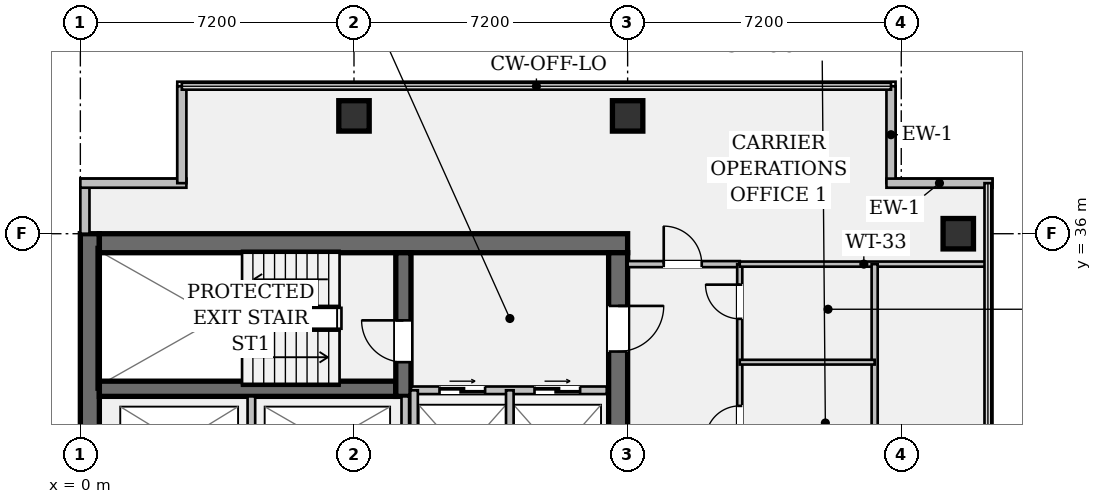
"""IFC4 building model, lengths in metres.
Left out: names, types, materials, properties, quantities, classifications, styles, units other than length and angle.
Written with IfcOpenShell. Run it as: python <this file> out.ifc"""

import sys

from ifc_helpers import new_model, si_unit, direction, frame, frame_2d, origin, origin_2d, place, context, subcontext, project, spatial, rectangle, hollow_rectangle, extrude, element, fill, save


model = new_model("IFC4")
c1 = context("Model", 3, precision=1e-05, world=origin(), true_north=direction((0.0, 1.0)))
c2 = subcontext(c1, "Body", "Model", "MODEL_VIEW")
j1 = project(units=[si_unit("LENGTHUNIT", "METRE"), si_unit("PLANEANGLEUNIT", "RADIAN")], contexts=[c1])
p1 = place(None, origin())
s1 = spatial("IfcSite", under=j1, at=p1, CompositionType="ELEMENT")
p2 = place(p1, origin())
s2 = spatial("IfcBuilding", under=s1, at=p2, CompositionType="ELEMENT")
p3 = place(p2, frame((0.0, 0.0, 187.25)))
s3 = spatial("IfcBuildingStorey", under=s2, at=p3, CompositionType="ELEMENT", Elevation=187.25)
p4 = place(p3, frame((0.25, 7.2, 0.0), z_axis=(0.0, 0.0, 1.0), x_axis=(0.0, 1.0, 0.0)))
e1 = element("IfcWall", 1, at=p4, inside=s3, PredefinedType="SHEAR", context=c2, shape_type="SweptSolid", body=[
    extrude(rectangle(XDim=28.8, YDim=0.5, at=frame_2d((14.4, 0.0))), origin(), (0.0, 0.0, 1.0), 3.24),
])
p5 = place(p3, frame((0.5, 35.75, 0.0), z_axis=(0.0, 0.0, 1.0), x_axis=(1.0, 0.0, 0.0)))
e2 = element("IfcWall", 2, at=p5, inside=s3, PredefinedType="SHEAR", context=c2, shape_type="SweptSolid", body=[
    extrude(rectangle(XDim=13.9, YDim=0.5, at=frame_2d((6.95, 0.0))), origin(), (0.0, 0.0, 1.0), 3.24),
])
p6 = place(p3, frame((14.15, 35.5, 0.0), z_axis=(0.0, 0.0, 1.0), x_axis=(0.0, -1.0, 0.0)))
e3 = element("IfcWall", 3, at=p6, inside=s3, PredefinedType="SHEAR", context=c2, shape_type="SweptSolid", body=[
    extrude(rectangle(XDim=27.8, YDim=0.5, at=frame_2d((13.9, 0.0))), origin(), (0.0, 0.0, 1.0), 3.24),
])
p7 = place(p6, frame((1.4, 0.0, 0.0)))
e4 = element("IfcOpeningElement", 4, at=p7, cuts=e3, PredefinedType="OPENING", context=c2, shape_type="SweptSolid", body=[
    extrude(rectangle(XDim=1.2, YDim=2.15, at=frame_2d((0.6, 1.075))), frame((0.0, 0.262, 0.0), z_axis=(0.0, -1.0, 0.0), x_axis=(1.0, 0.0, 0.0)), (0.0, 0.0, 1.0), 0.524),
])
p8 = place(p6, frame((25.35, 0.0, 0.0)))
e5 = element("IfcOpeningElement", 5, at=p8, cuts=e3, PredefinedType="OPENING", context=c2, shape_type="SweptSolid", body=[
    extrude(rectangle(XDim=1.2, YDim=2.15, at=frame_2d((0.6, 1.075))), frame((0.0, 0.262, 0.0), z_axis=(0.0, -1.0, 0.0), x_axis=(1.0, 0.0, 0.0)), (0.0, 0.0, 1.0), 0.524),
])
p9 = place(p6, frame((14.7, 0.0, 0.0)))
e6 = element("IfcOpeningElement", 6, at=p9, cuts=e3, PredefinedType="OPENING", context=c2, shape_type="SweptSolid", body=[
    extrude(rectangle(XDim=1.6, YDim=2.2, at=frame_2d((0.8, 1.1))), frame((0.0, 0.262, 0.0), z_axis=(0.0, -1.0, 0.0), x_axis=(1.0, 0.0, 0.0)), (0.0, 0.0, 1.0), 0.524),
])
p10 = place(p3, frame((0.5, 31.92, 0.0), z_axis=(0.0, 0.0, 1.0), x_axis=(1.0, 0.0, 0.0)))
e7 = element("IfcWall", 7, at=p10, inside=s3, PredefinedType="SHEAR", context=c2, shape_type="SweptSolid", body=[
    extrude(rectangle(XDim=7.8, YDim=0.4, at=frame_2d((3.9, 0.0))), origin(), (0.0, 0.0, 1.0), 3.24),
])
p11 = place(p3, frame((8.5, 31.72, 0.0), z_axis=(0.0, 0.0, 1.0), x_axis=(0.0, 1.0, 0.0)))
e8 = element("IfcWall", 8, at=p11, inside=s3, PredefinedType="SHEAR", context=c2, shape_type="SweptSolid", body=[
    extrude(rectangle(XDim=3.78, YDim=0.4, at=frame_2d((1.89, 0.0))), origin(), (0.0, 0.0, 1.0), 3.24),
])
p12 = place(p11, frame((0.9, 0.0, 0.0)))
e9 = element("IfcOpeningElement", 9, at=p12, cuts=e8, PredefinedType="OPENING", context=c2, shape_type="SweptSolid", body=[
    extrude(rectangle(XDim=1.1, YDim=2.15, at=frame_2d((0.55, 1.075))), frame((0.0, 0.212, 0.0), z_axis=(0.0, -1.0, 0.0), x_axis=(1.0, 0.0, 0.0)), (0.0, 0.0, 1.0), 0.424),
])
for number, where, z_axis, x_axis in (
    (10, (7.2, 39.1, 0.0), (0.0, 0.0, 1.0), (1.0, 0.0, 0.0)),
    (11, (14.4, 39.1, 0.0), (0.0, 0.0, 1.0), (1.0, 0.0, 0.0)),
    (12, (23.1, 36.0, 0.0), (0.0, 0.0, 1.0), (1.0, 0.0, 0.0)),
):
    element("IfcColumn", number, at=place(p3, frame(where, z_axis=z_axis, x_axis=x_axis)), inside=s3, PredefinedType="COLUMN", context=c2, shape_type="SweptSolid", body=[
        extrude(hollow_rectangle(XDim=0.8, YDim=0.8, WallThickness=0.05, at=origin_2d()), origin(), (0.0, 0.0, 1.0), 3.24),
    ])
p13 = place(p3, frame((0.12, 36.0, 0.0), z_axis=(0.0, 0.0, 1.0), x_axis=(0.0, 1.0, 0.0)))
e13 = element("IfcWall", 13, at=p13, inside=s3, PredefinedType="STANDARD", context=c2, shape_type="SweptSolid", body=[
    extrude(rectangle(XDim=1.33, YDim=0.24, at=frame_2d((0.665, 0.0))), origin(), (0.0, 0.0, 1.0), 3.24),
])
p14 = place(p3, frame((0.0, 37.33, 0.0), z_axis=(0.0, 0.0, 1.0), x_axis=(1.0, 0.0, 0.0)))
e14 = element("IfcWall", 14, at=p14, inside=s3, PredefinedType="STANDARD", context=c2, shape_type="SweptSolid", body=[
    extrude(rectangle(XDim=2.79, YDim=0.24, at=frame_2d((1.395, 0.0))), origin(), (0.0, 0.0, 1.0), 3.24),
])
for number, where, z_axis, x_axis in (
    (15, (2.67, 37.33, 0.0), (0.0, 0.0, 1.0), (0.0, 1.0, 0.0)),
    (16, (21.33, 39.88, 0.0), (0.0, 0.0, 1.0), (0.0, -1.0, 0.0)),
):
    element("IfcWall", number, at=place(p3, frame(where, z_axis=z_axis, x_axis=x_axis)), inside=s3, PredefinedType="STANDARD", context=c2, shape_type="SweptSolid", body=[
        extrude(rectangle(XDim=2.55, YDim=0.24, at=frame_2d((1.275, 0.0))), origin(), (0.0, 0.0, 1.0), 3.24),
    ])
p15 = place(p3, frame((21.21, 37.33, 0.0), z_axis=(0.0, 0.0, 1.0), x_axis=(1.0, 0.0, 0.0)))
e17 = element("IfcWall", 17, at=p15, inside=s3, PredefinedType="STANDARD", context=c2, shape_type="SweptSolid", body=[
    extrude(rectangle(XDim=2.79, YDim=0.24, at=frame_2d((1.395, 0.0))), origin(), (0.0, 0.0, 1.0), 3.24),
])
p16 = place(p3, frame((8.7, 31.88, 0.0), z_axis=(0.0, 0.0, 1.0), x_axis=(1.0, 0.0, 0.0)))
e18 = element("IfcWall", 18, at=p16, inside=s3, PredefinedType="PARTITIONING", context=c2, shape_type="SweptSolid", body=[
    extrude(rectangle(XDim=5.15, YDim=0.2, at=frame_2d((2.575, 0.0))), origin(), (0.0, 0.0, 1.0), 3.24),
])
p17 = place(p16, frame((0.75, 0.0, 0.0)))
e19 = element("IfcOpeningElement", 19, at=p17, cuts=e18, PredefinedType="OPENING", context=c2, shape_type="SweptSolid", body=[
    extrude(rectangle(XDim=1.2, YDim=2.2, at=frame_2d((0.6, 1.1))), frame((0.0, 0.112, 0.0), z_axis=(0.0, -1.0, 0.0), x_axis=(1.0, 0.0, 0.0)), (0.0, 0.0, 1.0), 0.224),
])
p18 = place(p16, frame((3.25, 0.0, 0.0)))
e20 = element("IfcOpeningElement", 20, at=p18, cuts=e18, PredefinedType="OPENING", context=c2, shape_type="SweptSolid", body=[
    extrude(rectangle(XDim=1.2, YDim=2.2, at=frame_2d((0.6, 1.1))), frame((0.0, 0.112, 0.0), z_axis=(0.0, -1.0, 0.0), x_axis=(1.0, 0.0, 0.0)), (0.0, 0.0, 1.0), 0.224),
])
for number, where, z_axis, x_axis in (
    (21, (8.78, 28.78, 0.0), (0.0, 0.0, 1.0), (0.0, 1.0, 0.0)),
    (22, (11.3, 28.78, 0.0), (0.0, 0.0, 1.0), (0.0, 1.0, 0.0)),
):
    element("IfcWall", number, at=place(p3, frame(where, z_axis=z_axis, x_axis=x_axis)), inside=s3, PredefinedType="PARTITIONING", context=c2, shape_type="SweptSolid", body=[
        extrude(rectangle(XDim=3.1, YDim=0.2, at=frame_2d((1.55, 0.0))), origin(), (0.0, 0.0, 1.0), 3.24),
    ])
for number, where, z_axis, x_axis in (
    (23, (4.5, 28.78, 0.0), (0.0, 0.0, 1.0), (0.0, 1.0, 0.0)),
    (24, (8.55, 28.78, 0.0), (0.0, 0.0, 1.0), (0.0, 1.0, 0.0)),
):
    element("IfcWall", number, at=place(p3, frame(where, z_axis=z_axis, x_axis=x_axis)), inside=s3, PredefinedType="PARTITIONING", context=c2, shape_type="SweptSolid", body=[
        extrude(rectangle(XDim=2.94, YDim=0.2, at=frame_2d((1.47, 0.0))), origin(), (0.0, 0.0, 1.0), 3.24),
    ])
p19 = place(p3, frame((14.4, 35.2, 0.0), z_axis=(0.0, 0.0, 1.0), x_axis=(1.0, 0.0, 0.0)))
e25 = element("IfcWall", 25, at=p19, inside=s3, PredefinedType="PARTITIONING", context=c2, shape_type="SweptSolid", body=[
    extrude(rectangle(XDim=2.95, YDim=0.16, at=frame_2d((1.475, 0.0))), origin(), (0.0, 0.0, 1.0), 2.808),
])
p20 = place(p19, frame((0.95, 0.0, 0.0)))
e26 = element("IfcOpeningElement", 26, at=p20, cuts=e25, PredefinedType="OPENING", context=c2, shape_type="SweptSolid", body=[
    extrude(rectangle(XDim=1.0, YDim=2.15, at=frame_2d((0.5, 1.075))), frame((0.0, 0.092, 0.0), z_axis=(0.0, -1.0, 0.0), x_axis=(1.0, 0.0, 0.0)), (0.0, 0.0, 1.0), 0.184),
])
p21 = place(p3, frame((17.35, 20.35, 0.0), z_axis=(0.0, 0.0, 1.0), x_axis=(0.0, 1.0, 0.0)))
e27 = element("IfcWall", 27, at=p21, inside=s3, PredefinedType="PARTITIONING", context=c2, shape_type="SweptSolid", body=[
    extrude(rectangle(XDim=14.85, YDim=0.135, at=frame_2d((7.425, 0.0))), origin(), (0.0, 0.0, 1.0), 2.603),
])
p22 = place(p21, frame((3.84, 0.0, 0.0)))
e28 = element("IfcOpeningElement", 28, at=p22, cuts=e27, PredefinedType="OPENING", context=c2, shape_type="SweptSolid", body=[
    extrude(rectangle(XDim=0.9, YDim=2.15, at=frame_2d((0.45, 1.075))), frame((0.0, 0.08, 0.0), z_axis=(0.0, -1.0, 0.0), x_axis=(1.0, 0.0, 0.0)), (0.0, 0.0, 1.0), 0.159),
])
p23 = place(p21, frame((7.04, 0.0, 0.0)))
e29 = element("IfcOpeningElement", 29, at=p23, cuts=e27, PredefinedType="OPENING", context=c2, shape_type="SweptSolid", body=[
    extrude(rectangle(XDim=0.9, YDim=2.15, at=frame_2d((0.45, 1.075))), frame((0.0, 0.08, 0.0), z_axis=(0.0, -1.0, 0.0), x_axis=(1.0, 0.0, 0.0)), (0.0, 0.0, 1.0), 0.159),
])
p24 = place(p21, frame((10.22, 0.0, 0.0)))
e30 = element("IfcOpeningElement", 30, at=p24, cuts=e27, PredefinedType="OPENING", context=c2, shape_type="SweptSolid", body=[
    extrude(rectangle(XDim=0.9, YDim=2.15, at=frame_2d((0.45, 1.075))), frame((0.0, 0.08, 0.0), z_axis=(0.0, -1.0, 0.0), x_axis=(1.0, 0.0, 0.0)), (0.0, 0.0, 1.0), 0.159),
])
p25 = place(p21, frame((13.41, 0.0, 0.0)))
e31 = element("IfcOpeningElement", 31, at=p25, cuts=e27, PredefinedType="OPENING", context=c2, shape_type="SweptSolid", body=[
    extrude(rectangle(XDim=0.9, YDim=2.15, at=frame_2d((0.45, 1.075))), frame((0.0, 0.08, 0.0), z_axis=(0.0, -1.0, 0.0), x_axis=(1.0, 0.0, 0.0)), (0.0, 0.0, 1.0), 0.159),
])
p26 = place(p3, frame((17.35, 35.2, 0.0), z_axis=(0.0, 0.0, 1.0), x_axis=(1.0, 0.0, 0.0)))
e32 = element("IfcWall", 32, at=p26, inside=s3, PredefinedType="PARTITIONING", context=c2, shape_type="SweptSolid", body=[
    extrude(rectangle(XDim=6.53, YDim=0.135, at=frame_2d((3.265, 0.0))), origin(), (0.0, 0.0, 1.0), 2.758),
])
p27 = place(p3, frame((20.9, 22.95, 0.0), z_axis=(0.0, 0.0, 1.0), x_axis=(0.0, 1.0, 0.0)))
e33 = element("IfcWall", 33, at=p27, inside=s3, PredefinedType="PARTITIONING", context=c2, shape_type="SweptSolid", body=[
    extrude(rectangle(XDim=12.25, YDim=0.16, at=frame_2d((6.125, 0.0))), origin(), (0.0, 0.0, 1.0), 2.603),
])
p28 = place(p3, frame((17.35, 32.62, 0.0), z_axis=(0.0, 0.0, 1.0), x_axis=(1.0, 0.0, 0.0)))
e34 = element("IfcWall", 34, at=p28, inside=s3, PredefinedType="PARTITIONING", context=c2, shape_type="SweptSolid", body=[
    extrude(rectangle(XDim=3.55, YDim=0.125, at=frame_2d((1.775, 0.0))), origin(), (0.0, 0.0, 1.0), 2.808),
])
p29 = place(p12, origin())
e35 = element("IfcDoor", 35, at=p29, inside=s3, OperationType="SINGLE_SWING_RIGHT", PredefinedType="DOOR", context=c2, shape_type="SweptSolid", body=[
    extrude(rectangle(XDim=1.1, YDim=2.15, at=frame_2d((0.55, 1.075))), frame((0.0, 0.025, 0.0), z_axis=(0.0, -1.0, 0.0), x_axis=(1.0, 0.0, 0.0)), (0.0, 0.0, 1.0), 0.05),
])
fill(e9, e35)
p30 = place(p7, origin())
e36 = element("IfcDoor", 36, at=p30, inside=s3, OperationType="SINGLE_SWING_LEFT", PredefinedType="DOOR", context=c2, shape_type="SweptSolid", body=[
    extrude(rectangle(XDim=1.2, YDim=2.15, at=frame_2d((0.6, 1.075))), frame((0.0, 0.025, 0.0), z_axis=(0.0, -1.0, 0.0), x_axis=(1.0, 0.0, 0.0)), (0.0, 0.0, 1.0), 0.05),
])
fill(e4, e36)
p31 = place(p17, origin())
e37 = element("IfcDoor", 37, at=p31, inside=s3, OperationType="DOUBLE_DOOR_SLIDING", PredefinedType="DOOR", context=c2, shape_type="SweptSolid", body=[
    extrude(rectangle(XDim=1.2, YDim=2.2, at=frame_2d((0.6, 1.1))), frame((0.0, 0.025, 0.0), z_axis=(0.0, -1.0, 0.0), x_axis=(1.0, 0.0, 0.0)), (0.0, 0.0, 1.0), 0.05),
])
fill(e19, e37)
p32 = place(p18, origin())
e38 = element("IfcDoor", 38, at=p32, inside=s3, OperationType="DOUBLE_DOOR_SLIDING", PredefinedType="DOOR", context=c2, shape_type="SweptSolid", body=[
    extrude(rectangle(XDim=1.2, YDim=2.2, at=frame_2d((0.6, 1.1))), frame((0.0, 0.025, 0.0), z_axis=(0.0, -1.0, 0.0), x_axis=(1.0, 0.0, 0.0)), (0.0, 0.0, 1.0), 0.05),
])
fill(e20, e38)
p33 = place(p20, origin())
e39 = element("IfcDoor", 39, at=p33, inside=s3, OperationType="SINGLE_SWING_LEFT", PredefinedType="DOOR", context=c2, shape_type="SweptSolid", body=[
    extrude(rectangle(XDim=1.0, YDim=2.15, at=frame_2d((0.5, 1.075))), frame((0.0, 0.025, 0.0), z_axis=(0.0, -1.0, 0.0), x_axis=(1.0, 0.0, 0.0)), (0.0, 0.0, 1.0), 0.05),
])
fill(e26, e39)
p34 = place(p24, origin())
e40 = element("IfcDoor", 40, at=p34, inside=s3, OperationType="SINGLE_SWING_LEFT", PredefinedType="DOOR", context=c2, shape_type="SweptSolid", body=[
    extrude(rectangle(XDim=0.9, YDim=2.15, at=frame_2d((0.45, 1.075))), frame((0.0, 0.025, 0.0), z_axis=(0.0, -1.0, 0.0), x_axis=(1.0, 0.0, 0.0)), (0.0, 0.0, 1.0), 0.05),
])
fill(e30, e40)
p35 = place(p25, origin())
e41 = element("IfcDoor", 41, at=p35, inside=s3, OperationType="SINGLE_SWING_RIGHT", PredefinedType="DOOR", context=c2, shape_type="SweptSolid", body=[
    extrude(rectangle(XDim=0.9, YDim=2.15, at=frame_2d((0.45, 1.075))), frame((0.0, 0.025, 0.0), z_axis=(0.0, -1.0, 0.0), x_axis=(1.0, 0.0, 0.0)), (0.0, 0.0, 1.0), 0.05),
])
fill(e31, e41)
save(model, sys.argv[1])
